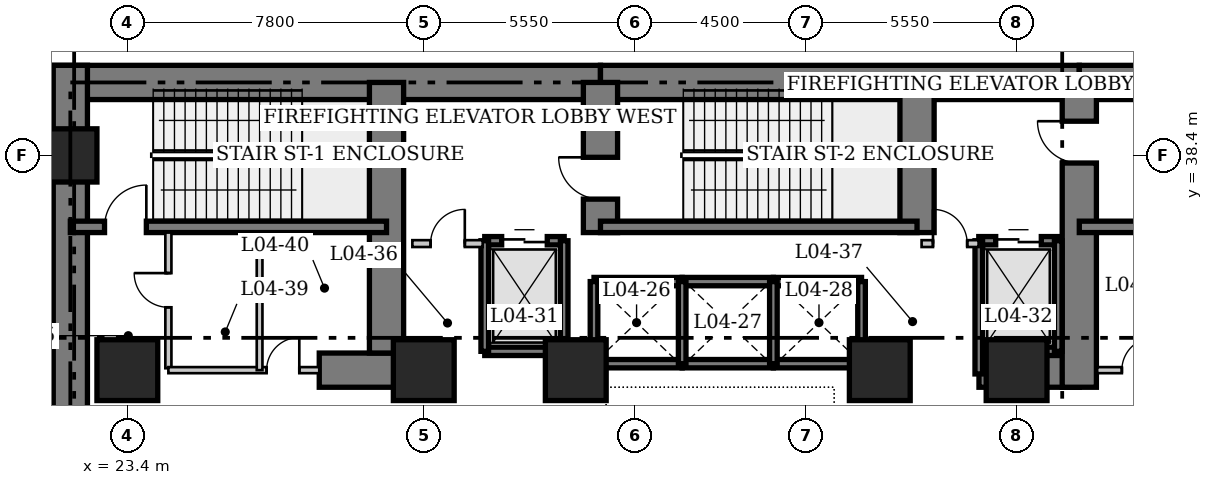
"""IFC4 building model, lengths in metres.
Left out: names, types, materials, properties, quantities, classifications, styles, units other than length and angle.
Written with IfcOpenShell. Run it as: python <this file> out.ifc"""

import sys

from ifc_helpers import new_model, si_unit, direction, frame, frame_2d, origin, origin_2d, place, context, subcontext, project, spatial, rectangle, extrude, element, fill, save


model = new_model("IFC4")
c1 = context("Model", 3, precision=1e-05, world=origin(), true_north=direction((0.0, 1.0)))
c2 = subcontext(c1, "Body", "Model", "MODEL_VIEW")
j1 = project(units=[si_unit("LENGTHUNIT", "METRE"), si_unit("PLANEANGLEUNIT", "RADIAN")], contexts=[c1])
p1 = place(None, origin())
s1 = spatial("IfcSite", under=j1, at=p1, CompositionType="ELEMENT")
p2 = place(p1, origin())
s2 = spatial("IfcBuilding", under=s1, at=p2, CompositionType="ELEMENT")
p3 = place(p2, frame((0.0, 0.0, 20.8)))
s3 = spatial("IfcBuildingStorey", under=s2, at=p3, CompositionType="ELEMENT", Elevation=20.8)
p4 = place(p3, frame((21.45, 40.32, 0.0), z_axis=(0.0, 0.0, 1.0), x_axis=(1.0, 0.0, 0.0)))
e1 = element("IfcWall", 1, at=p4, inside=s3, PredefinedType="SHEAR", context=c2, shape_type="SweptSolid", body=[
    extrude(rectangle(XDim=14.4, YDim=0.9, at=frame_2d((7.2, 0.0))), origin(), (0.0, 0.0, 1.0), 5.2),
])
p5 = place(p3, frame((35.85, 40.32, 0.0), z_axis=(0.0, 0.0, 1.0), x_axis=(1.0, 0.0, 0.0)))
e2 = element("IfcWall", 2, at=p5, inside=s3, PredefinedType="SHEAR", context=c2, shape_type="SweptSolid", body=[
    extrude(rectangle(XDim=12.6, YDim=0.9, at=frame_2d((6.3, 0.0))), origin(), (0.0, 0.0, 1.0), 5.2),
])
p6 = place(p3, frame((48.45, 40.32, 0.0), z_axis=(0.0, 0.0, 1.0), x_axis=(1.0, 0.0, 0.0)))
e3 = element("IfcWall", 3, at=p6, inside=s3, PredefinedType="SHEAR", context=c2, shape_type="SweptSolid", body=[
    extrude(rectangle(XDim=8.97, YDim=0.9, at=frame_2d((4.485, 0.0))), origin(), (0.0, 0.0, 1.0), 5.2),
])
p7 = place(p3, frame((21.9, 27.05, 0.0), z_axis=(0.0, 0.0, 1.0), x_axis=(0.0, 1.0, 0.0)))
e4 = element("IfcWall", 4, at=p7, inside=s3, PredefinedType="SHEAR", context=c2, shape_type="SweptSolid", body=[
    extrude(rectangle(XDim=13.72, YDim=0.9, at=frame_2d((6.86, 0.0))), origin(), (0.0, 0.0, 1.0), 5.2),
])
p8 = place(p3, frame((28.45, 32.75, 0.0), z_axis=(0.0, 0.0, 1.0), x_axis=(1.0, 0.0, 0.0)))
e5 = element("IfcWall", 5, at=p8, inside=s3, PredefinedType="SHEAR", context=c2, shape_type="SweptSolid", body=[
    extrude(rectangle(XDim=2.4, YDim=0.9, at=frame_2d((1.2, 0.0))), origin(), (0.0, 0.0, 1.0), 5.2),
])
p9 = place(p3, frame((45.81, 32.75, 0.0), z_axis=(0.0, 0.0, 1.0), x_axis=(1.0, 0.0, 0.0)))
e6 = element("IfcWall", 6, at=p9, inside=s3, PredefinedType="SHEAR", context=c2, shape_type="SweptSolid", body=[
    extrude(rectangle(XDim=2.64, YDim=0.9, at=frame_2d((1.32, 0.0))), origin(), (0.0, 0.0, 1.0), 5.2),
])
p10 = place(p3, frame((30.22, 33.2, 0.0), z_axis=(0.0, 0.0, 1.0), x_axis=(0.0, 1.0, 0.0)))
e7 = element("IfcWall", 7, at=p10, inside=s3, PredefinedType="SHEAR", context=c2, shape_type="SweptSolid", body=[
    extrude(rectangle(XDim=7.12, YDim=0.9, at=frame_2d((3.56, 0.0))), origin(), (0.0, 0.0, 1.0), 5.2),
])
p11 = place(p3, frame((35.85, 36.37, 0.0), z_axis=(0.0, 0.0, 1.0), x_axis=(0.0, 1.0, 0.0)))
e8 = element("IfcWall", 8, at=p11, inside=s3, PredefinedType="SHEAR", context=c2, shape_type="SweptSolid", body=[
    extrude(rectangle(XDim=3.95, YDim=0.9, at=frame_2d((1.975, 0.0))), origin(), (0.0, 0.0, 1.0), 5.2),
])
p12 = place(p11, frame((0.88, 0.0, 0.0)))
e9 = element("IfcOpeningElement", 9, at=p12, cuts=e8, PredefinedType="OPENING", context=c2, shape_type="SweptSolid", body=[
    extrude(rectangle(XDim=1.1, YDim=2.15, at=frame_2d((0.55, 1.075))), frame((0.0, 0.46, 0.0), z_axis=(0.0, -1.0, 0.0), x_axis=(1.0, 0.0, 0.0)), (0.0, 0.0, 1.0), 0.92),
])
p13 = place(p3, frame((44.18, 36.37, 0.0), z_axis=(0.0, 0.0, 1.0), x_axis=(0.0, 1.0, 0.0)))
e10 = element("IfcWall", 10, at=p13, inside=s3, PredefinedType="SHEAR", context=c2, shape_type="SweptSolid", body=[
    extrude(rectangle(XDim=3.95, YDim=0.9, at=frame_2d((1.975, 0.0))), origin(), (0.0, 0.0, 1.0), 5.2),
])
p14 = place(p3, frame((48.45, 32.3, 0.0), z_axis=(0.0, 0.0, 1.0), x_axis=(0.0, 1.0, 0.0)))
e11 = element("IfcWall", 11, at=p14, inside=s3, PredefinedType="SHEAR", context=c2, shape_type="SweptSolid", body=[
    extrude(rectangle(XDim=8.02, YDim=0.9, at=frame_2d((4.01, 0.0))), origin(), (0.0, 0.0, 1.0), 5.2),
])
p15 = place(p14, frame((5.9, 0.0, 0.0)))
e12 = element("IfcOpeningElement", 12, at=p15, cuts=e11, PredefinedType="OPENING", context=c2, shape_type="SweptSolid", body=[
    extrude(rectangle(XDim=1.1, YDim=2.15, at=frame_2d((0.55, 1.075))), frame((0.0, 0.46, 0.0), z_axis=(0.0, -1.0, 0.0), x_axis=(1.0, 0.0, 0.0)), (0.0, 0.0, 1.0), 0.92),
])
p16 = place(p3, frame((21.9, 36.52, 0.0), z_axis=(0.0, 0.0, 1.0), x_axis=(1.0, 0.0, 0.0)))
e13 = element("IfcWall", 13, at=p16, inside=s3, PredefinedType="SHEAR", context=c2, shape_type="SweptSolid", body=[
    extrude(rectangle(XDim=8.32, YDim=0.3, at=frame_2d((4.16, 0.0))), origin(), (0.0, 0.0, 1.0), 5.2),
])
p17 = place(p16, frame((0.9, 0.0, 0.0)))
e14 = element("IfcOpeningElement", 14, at=p17, cuts=e13, PredefinedType="OPENING", context=c2, shape_type="SweptSolid", body=[
    extrude(rectangle(XDim=1.1, YDim=2.15, at=frame_2d((0.55, 1.075))), frame((0.0, 0.16, 0.0), z_axis=(0.0, -1.0, 0.0), x_axis=(1.0, 0.0, 0.0)), (0.0, 0.0, 1.0), 0.32),
])
p18 = place(p3, frame((35.85, 36.52, 0.0), z_axis=(0.0, 0.0, 1.0), x_axis=(1.0, 0.0, 0.0)))
e15 = element("IfcWall", 15, at=p18, inside=s3, PredefinedType="SHEAR", context=c2, shape_type="SweptSolid", body=[
    extrude(rectangle(XDim=8.33, YDim=0.3, at=frame_2d((4.165, 0.0))), origin(), (0.0, 0.0, 1.0), 5.2),
])
p19 = place(p3, frame((48.45, 36.52, 0.0), z_axis=(0.0, 0.0, 1.0), x_axis=(1.0, 0.0, 0.0)))
e16 = element("IfcWall", 16, at=p19, inside=s3, PredefinedType="SHEAR", context=c2, shape_type="SweptSolid", body=[
    extrude(rectangle(XDim=8.52, YDim=0.3, at=frame_2d((4.26, 0.0))), origin(), (0.0, 0.0, 1.0), 5.2),
])
p20 = place(p3, frame((21.9, 38.4, 0.0), z_axis=(0.0, 0.0, 1.0), x_axis=(1.0, 0.0, 0.0)))
e17 = element("IfcColumn", 17, at=p20, inside=s3, PredefinedType="COLUMN", context=c2, shape_type="SweptSolid", body=[
    extrude(rectangle(XDim=1.4, YDim=1.4, at=origin_2d()), origin(), (0.0, 0.0, 1.0), 5.2),
])
for number, where, z_axis, x_axis in (
    (18, (23.4, 32.75, 0.0), (0.0, 0.0, 1.0), (1.0, 0.0, 0.0)),
    (19, (31.2, 32.75, 0.0), (0.0, 0.0, 1.0), (1.0, 0.0, 0.0)),
    (20, (35.2, 32.75, 0.0), (0.0, 0.0, 1.0), (1.0, 0.0, 0.0)),
    (21, (43.2, 32.75, 0.0), (0.0, 0.0, 1.0), (1.0, 0.0, 0.0)),
    (22, (46.8, 32.75, 0.0), (0.0, 0.0, 1.0), (1.0, 0.0, 0.0)),
):
    element("IfcColumn", number, at=place(p3, frame(where, z_axis=z_axis, x_axis=x_axis)), inside=s3, PredefinedType="COLUMN", context=c2, shape_type="SweptSolid", body=[
        extrude(rectangle(XDim=1.6, YDim=1.6, at=origin_2d()), origin(), (0.0, 0.0, 1.0), 5.2),
    ])
for number, where, z_axis, x_axis in (
    (23, (35.68, 35.08, 0.0), (0.0, 0.0, 1.0), (1.0, 0.0, 0.0)),
    (24, (35.68, 32.92, 0.0), (0.0, 0.0, 1.0), (1.0, 0.0, 0.0)),
):
    element("IfcWall", number, at=place(p3, frame(where, z_axis=z_axis, x_axis=x_axis)), inside=s3, PredefinedType="SHEAR", context=c2, shape_type="SweptSolid", body=[
        extrude(rectangle(XDim=2.32, YDim=0.22, at=frame_2d((1.16, 0.0))), origin(), (0.0, 0.0, 1.0), 5.2),
    ])
p21 = place(p3, frame((35.68, 32.92, 0.0), z_axis=(0.0, 0.0, 1.0), x_axis=(0.0, 1.0, 0.0)))
e25 = element("IfcWall", 25, at=p21, inside=s3, PredefinedType="SHEAR", context=c2, shape_type="SweptSolid", body=[
    extrude(rectangle(XDim=2.16, YDim=0.2, at=frame_2d((1.08, 0.0))), origin(), (0.0, 0.0, 1.0), 5.2),
])
for number, where, z_axis, x_axis in (
    (26, (38.0, 35.08, 0.0), (0.0, 0.0, 1.0), (1.0, 0.0, 0.0)),
    (27, (38.0, 32.92, 0.0), (0.0, 0.0, 1.0), (1.0, 0.0, 0.0)),
):
    element("IfcWall", number, at=place(p3, frame(where, z_axis=z_axis, x_axis=x_axis)), inside=s3, PredefinedType="SHEAR", context=c2, shape_type="SweptSolid", body=[
        extrude(rectangle(XDim=2.4, YDim=0.22, at=frame_2d((1.2, 0.0))), origin(), (0.0, 0.0, 1.0), 5.2),
    ])
p22 = place(p3, frame((38.0, 32.92, 0.0), z_axis=(0.0, 0.0, 1.0), x_axis=(0.0, 1.0, 0.0)))
e28 = element("IfcWall", 28, at=p22, inside=s3, PredefinedType="SHEAR", context=c2, shape_type="SweptSolid", body=[
    extrude(rectangle(XDim=2.16, YDim=0.2, at=frame_2d((1.08, 0.0))), origin(), (0.0, 0.0, 1.0), 5.2),
])
for number, where, z_axis, x_axis in (
    (29, (40.4, 35.08, 0.0), (0.0, 0.0, 1.0), (1.0, 0.0, 0.0)),
    (30, (40.4, 32.92, 0.0), (0.0, 0.0, 1.0), (1.0, 0.0, 0.0)),
):
    element("IfcWall", number, at=place(p3, frame(where, z_axis=z_axis, x_axis=x_axis)), inside=s3, PredefinedType="SHEAR", context=c2, shape_type="SweptSolid", body=[
        extrude(rectangle(XDim=2.32, YDim=0.22, at=frame_2d((1.16, 0.0))), origin(), (0.0, 0.0, 1.0), 5.2),
    ])
for number, where, z_axis, x_axis in (
    (31, (40.4, 32.92, 0.0), (0.0, 0.0, 1.0), (0.0, 1.0, 0.0)),
    (32, (42.72, 32.92, 0.0), (0.0, 0.0, 1.0), (0.0, 1.0, 0.0)),
):
    element("IfcWall", number, at=place(p3, frame(where, z_axis=z_axis, x_axis=x_axis)), inside=s3, PredefinedType="SHEAR", context=c2, shape_type="SweptSolid", body=[
        extrude(rectangle(XDim=2.16, YDim=0.2, at=frame_2d((1.08, 0.0))), origin(), (0.0, 0.0, 1.0), 5.2),
    ])
p23 = place(p3, frame((32.805, 36.155, 0.0), z_axis=(0.0, 0.0, 1.0), x_axis=(1.0, 0.0, 0.0)))
e33 = element("IfcWall", 33, at=p23, inside=s3, PredefinedType="SHEAR", context=c2, shape_type="SweptSolid", body=[
    extrude(rectangle(XDim=2.09, YDim=0.22, at=frame_2d((1.045, 0.0))), origin(), (0.0, 0.0, 1.0), 5.2),
])
p24 = place(p23, frame((0.445, 0.0, 0.0)))
e34 = element("IfcOpeningElement", 34, at=p24, cuts=e33, PredefinedType="OPENING", context=c2, shape_type="SweptSolid", body=[
    extrude(rectangle(XDim=1.2, YDim=2.15, at=frame_2d((0.6, 1.075))), frame((0.0, 0.12, 0.0), z_axis=(0.0, -1.0, 0.0), x_axis=(1.0, 0.0, 0.0)), (0.0, 0.0, 1.0), 0.24),
])
p25 = place(p3, frame((32.805, 33.245, 0.0), z_axis=(0.0, 0.0, 1.0), x_axis=(1.0, 0.0, 0.0)))
e35 = element("IfcWall", 35, at=p25, inside=s3, PredefinedType="SHEAR", context=c2, shape_type="SweptSolid", body=[
    extrude(rectangle(XDim=2.09, YDim=0.22, at=frame_2d((1.045, 0.0))), origin(), (0.0, 0.0, 1.0), 5.2),
])
for number, where, z_axis, x_axis in (
    (36, (32.805, 33.245, 0.0), (0.0, 0.0, 1.0), (0.0, 1.0, 0.0)),
    (37, (34.895, 33.245, 0.0), (0.0, 0.0, 1.0), (0.0, 1.0, 0.0)),
):
    element("IfcWall", number, at=place(p3, frame(where, z_axis=z_axis, x_axis=x_axis)), inside=s3, PredefinedType="SHEAR", context=c2, shape_type="SweptSolid", body=[
        extrude(rectangle(XDim=2.91, YDim=0.2, at=frame_2d((1.455, 0.0))), origin(), (0.0, 0.0, 1.0), 5.2),
    ])
p26 = place(p3, frame((45.805, 36.155, 0.0), z_axis=(0.0, 0.0, 1.0), x_axis=(1.0, 0.0, 0.0)))
e38 = element("IfcWall", 38, at=p26, inside=s3, PredefinedType="SHEAR", context=c2, shape_type="SweptSolid", body=[
    extrude(rectangle(XDim=2.09, YDim=0.22, at=frame_2d((1.045, 0.0))), origin(), (0.0, 0.0, 1.0), 5.2),
])
p27 = place(p26, frame((0.445, 0.0, 0.0)))
e39 = element("IfcOpeningElement", 39, at=p27, cuts=e38, PredefinedType="OPENING", context=c2, shape_type="SweptSolid", body=[
    extrude(rectangle(XDim=1.2, YDim=2.15, at=frame_2d((0.6, 1.075))), frame((0.0, 0.12, 0.0), z_axis=(0.0, -1.0, 0.0), x_axis=(1.0, 0.0, 0.0)), (0.0, 0.0, 1.0), 0.24),
])
p28 = place(p3, frame((45.805, 33.245, 0.0), z_axis=(0.0, 0.0, 1.0), x_axis=(1.0, 0.0, 0.0)))
e40 = element("IfcWall", 40, at=p28, inside=s3, PredefinedType="SHEAR", context=c2, shape_type="SweptSolid", body=[
    extrude(rectangle(XDim=2.09, YDim=0.22, at=frame_2d((1.045, 0.0))), origin(), (0.0, 0.0, 1.0), 5.2),
])
p29 = place(p3, frame((45.805, 32.65, 0.0), z_axis=(0.0, 0.0, 1.0), x_axis=(0.0, 1.0, 0.0)))
e41 = element("IfcWall", 41, at=p29, inside=s3, PredefinedType="SHEAR", context=c2, shape_type="SweptSolid", body=[
    extrude(rectangle(XDim=3.505, YDim=0.2, at=frame_2d((1.752, 0.0))), origin(), (0.0, 0.0, 1.0), 5.2),
])
p30 = place(p3, frame((47.895, 33.245, 0.0), z_axis=(0.0, 0.0, 1.0), x_axis=(0.0, 1.0, 0.0)))
e42 = element("IfcWall", 42, at=p30, inside=s3, PredefinedType="SHEAR", context=c2, shape_type="SweptSolid", body=[
    extrude(rectangle(XDim=2.91, YDim=0.2, at=frame_2d((1.455, 0.0))), origin(), (0.0, 0.0, 1.0), 5.2),
])
p31 = place(p3, frame((30.9, 36.08, 0.0), z_axis=(0.0, 0.0, 1.0), x_axis=(1.0, 0.0, 0.0)))
e43 = element("IfcWall", 43, at=p31, inside=s3, PredefinedType="PARTITIONING", context=c2, shape_type="SweptSolid", body=[
    extrude(rectangle(XDim=1.85, YDim=0.18, at=frame_2d((0.925, 0.0))), origin(), (0.0, 0.0, 1.0), 4.94),
])
p32 = place(p31, frame((0.48, 0.0, 0.0)))
e44 = element("IfcOpeningElement", 44, at=p32, cuts=e43, PredefinedType="OPENING", context=c2, shape_type="SweptSolid", body=[
    extrude(rectangle(XDim=0.9, YDim=2.15, at=frame_2d((0.45, 1.075))), frame((0.0, 0.1, 0.0), z_axis=(0.0, -1.0, 0.0), x_axis=(1.0, 0.0, 0.0)), (0.0, 0.0, 1.0), 0.2),
])
p33 = place(p3, frame((44.3, 36.08, 0.0), z_axis=(0.0, 0.0, 1.0), x_axis=(1.0, 0.0, 0.0)))
e45 = element("IfcWall", 45, at=p33, inside=s3, PredefinedType="PARTITIONING", context=c2, shape_type="SweptSolid", body=[
    extrude(rectangle(XDim=1.5, YDim=0.18, at=frame_2d((0.75, 0.0))), origin(), (0.0, 0.0, 1.0), 4.94),
])
p34 = place(p33, frame((0.3, 0.0, 0.0)))
e46 = element("IfcOpeningElement", 46, at=p34, cuts=e45, PredefinedType="OPENING", context=c2, shape_type="SweptSolid", body=[
    extrude(rectangle(XDim=0.9, YDim=2.15, at=frame_2d((0.45, 1.075))), frame((0.0, 0.1, 0.0), z_axis=(0.0, -1.0, 0.0), x_axis=(1.0, 0.0, 0.0)), (0.0, 0.0, 1.0), 0.2),
])
p35 = place(p3, frame((24.48, 32.8, 0.0), z_axis=(0.0, 0.0, 1.0), x_axis=(0.0, 1.0, 0.0)))
e47 = element("IfcWall", 47, at=p35, inside=s3, PredefinedType="PARTITIONING", context=c2, shape_type="SweptSolid", body=[
    extrude(rectangle(XDim=3.57, YDim=0.16, at=frame_2d((1.785, 0.0))), origin(), (0.0, 0.0, 1.0), 4.94),
])
p36 = place(p35, frame((1.604, 0.0, 0.0)))
e48 = element("IfcOpeningElement", 48, at=p36, cuts=e47, PredefinedType="OPENING", context=c2, shape_type="SweptSolid", body=[
    extrude(rectangle(XDim=0.9, YDim=2.1, at=frame_2d((0.45, 1.05))), frame((0.0, 0.09, 0.0), z_axis=(0.0, -1.0, 0.0), x_axis=(1.0, 0.0, 0.0)), (0.0, 0.0, 1.0), 0.18),
])
p37 = place(p3, frame((24.48, 32.75, 0.0), z_axis=(0.0, 0.0, 1.0), x_axis=(1.0, 0.0, 0.0)))
e49 = element("IfcWall", 49, at=p37, inside=s3, PredefinedType="PARTITIONING", context=c2, shape_type="SweptSolid", body=[
    extrude(rectangle(XDim=3.97, YDim=0.16, at=frame_2d((1.985, 0.0))), origin(), (0.0, 0.0, 1.0), 4.94),
])
p38 = place(p37, frame((2.585, 0.0, 0.0)))
e50 = element("IfcOpeningElement", 50, at=p38, cuts=e49, PredefinedType="OPENING", context=c2, shape_type="SweptSolid", body=[
    extrude(rectangle(XDim=0.86, YDim=2.05, at=frame_2d((0.43, 1.025))), frame((0.0, 0.09, 0.0), z_axis=(0.0, -1.0, 0.0), x_axis=(1.0, 0.0, 0.0)), (0.0, 0.0, 1.0), 0.18),
])
p39 = place(p3, frame((48.92, 32.75, 0.0), z_axis=(0.0, 0.0, 1.0), x_axis=(1.0, 0.0, 0.0)))
e51 = element("IfcWall", 51, at=p39, inside=s3, PredefinedType="PARTITIONING", context=c2, shape_type="SweptSolid", body=[
    extrude(rectangle(XDim=2.2, YDim=0.16, at=frame_2d((1.1, 0.0))), origin(), (0.0, 0.0, 1.0), 4.94),
])
p40 = place(p39, frame((0.65, 0.0, 0.0)))
e52 = element("IfcOpeningElement", 52, at=p40, cuts=e51, PredefinedType="OPENING", context=c2, shape_type="SweptSolid", body=[
    extrude(rectangle(XDim=0.86, YDim=2.05, at=frame_2d((0.43, 1.025))), frame((0.0, 0.09, 0.0), z_axis=(0.0, -1.0, 0.0), x_axis=(1.0, 0.0, 0.0)), (0.0, 0.0, 1.0), 0.18),
])
p41 = place(p3, frame((26.88, 32.75, 0.0), z_axis=(0.0, 0.0, 1.0), x_axis=(0.0, 1.0, 0.0)))
e53 = element("IfcWall", 53, at=p41, inside=s3, PredefinedType="PARTITIONING", context=c2, shape_type="SweptSolid", body=[
    extrude(rectangle(XDim=3.62, YDim=0.15, at=frame_2d((1.81, 0.0))), origin(), (0.0, 0.0, 1.0), 4.94),
])
p42 = place(p24, origin())
e54 = element("IfcDoor", 54, at=p42, inside=s3, OperationType="DOUBLE_DOOR_SLIDING", PredefinedType="DOOR", context=c2, shape_type="SweptSolid", body=[
    extrude(rectangle(XDim=1.2, YDim=2.15, at=frame_2d((0.6, 1.075))), frame((0.0, 0.025, 0.0), z_axis=(0.0, -1.0, 0.0), x_axis=(1.0, 0.0, 0.0)), (0.0, 0.0, 1.0), 0.05),
])
fill(e34, e54)
p43 = place(p27, origin())
e55 = element("IfcDoor", 55, at=p43, inside=s3, OperationType="DOUBLE_DOOR_SLIDING", PredefinedType="DOOR", context=c2, shape_type="SweptSolid", body=[
    extrude(rectangle(XDim=1.2, YDim=2.15, at=frame_2d((0.6, 1.075))), frame((0.0, 0.025, 0.0), z_axis=(0.0, -1.0, 0.0), x_axis=(1.0, 0.0, 0.0)), (0.0, 0.0, 1.0), 0.05),
])
fill(e39, e55)
p44 = place(p32, origin())
e56 = element("IfcDoor", 56, at=p44, inside=s3, OperationType="SINGLE_SWING_RIGHT", PredefinedType="DOOR", context=c2, shape_type="SweptSolid", body=[
    extrude(rectangle(XDim=0.9, YDim=2.15, at=frame_2d((0.45, 1.075))), frame((0.0, 0.025, 0.0), z_axis=(0.0, -1.0, 0.0), x_axis=(1.0, 0.0, 0.0)), (0.0, 0.0, 1.0), 0.05),
])
fill(e44, e56)
p45 = place(p34, origin())
e57 = element("IfcDoor", 57, at=p45, inside=s3, OperationType="SINGLE_SWING_LEFT", PredefinedType="DOOR", context=c2, shape_type="SweptSolid", body=[
    extrude(rectangle(XDim=0.9, YDim=2.15, at=frame_2d((0.45, 1.075))), frame((0.0, 0.025, 0.0), z_axis=(0.0, -1.0, 0.0), x_axis=(1.0, 0.0, 0.0)), (0.0, 0.0, 1.0), 0.05),
])
fill(e46, e57)
p46 = place(p36, origin())
e58 = element("IfcDoor", 58, at=p46, inside=s3, OperationType="SINGLE_SWING_RIGHT", PredefinedType="DOOR", context=c2, shape_type="SweptSolid", body=[
    extrude(rectangle(XDim=0.9, YDim=2.1, at=frame_2d((0.45, 1.05))), frame((0.0, 0.025, 0.0), z_axis=(0.0, -1.0, 0.0), x_axis=(1.0, 0.0, 0.0)), (0.0, 0.0, 1.0), 0.05),
])
fill(e48, e58)
p47 = place(p38, origin())
e59 = element("IfcDoor", 59, at=p47, inside=s3, OperationType="SINGLE_SWING_RIGHT", PredefinedType="DOOR", context=c2, shape_type="SweptSolid", body=[
    extrude(rectangle(XDim=0.86, YDim=2.05, at=frame_2d((0.43, 1.025))), frame((0.0, 0.025, 0.0), z_axis=(0.0, -1.0, 0.0), x_axis=(1.0, 0.0, 0.0)), (0.0, 0.0, 1.0), 0.05),
])
fill(e50, e59)
p48 = place(p40, origin())
e60 = element("IfcDoor", 60, at=p48, inside=s3, OperationType="SINGLE_SWING_RIGHT", PredefinedType="DOOR", context=c2, shape_type="SweptSolid", body=[
    extrude(rectangle(XDim=0.86, YDim=2.05, at=frame_2d((0.43, 1.025))), frame((0.0, 0.025, 0.0), z_axis=(0.0, -1.0, 0.0), x_axis=(1.0, 0.0, 0.0)), (0.0, 0.0, 1.0), 0.05),
])
fill(e52, e60)
p49 = place(p17, origin())
e61 = element("IfcDoor", 61, at=p49, inside=s3, OperationType="SINGLE_SWING_RIGHT", PredefinedType="DOOR", context=c2, shape_type="SweptSolid", body=[
    extrude(rectangle(XDim=1.1, YDim=2.15, at=frame_2d((0.55, 1.075))), frame((0.0, 0.025, 0.0), z_axis=(0.0, -1.0, 0.0), x_axis=(1.0, 0.0, 0.0)), (0.0, 0.0, 1.0), 0.05),
])
fill(e14, e61)
p50 = place(p12, origin())
e62 = element("IfcDoor", 62, at=p50, inside=s3, OperationType="SINGLE_SWING_RIGHT", PredefinedType="DOOR", context=c2, shape_type="SweptSolid", body=[
    extrude(rectangle(XDim=1.1, YDim=2.15, at=frame_2d((0.55, 1.075))), frame((0.0, 0.025, 0.0), z_axis=(0.0, -1.0, 0.0), x_axis=(1.0, 0.0, 0.0)), (0.0, 0.0, 1.0), 0.05),
])
fill(e9, e62)
p51 = place(p15, origin())
e63 = element("IfcDoor", 63, at=p51, inside=s3, OperationType="SINGLE_SWING_RIGHT", PredefinedType="DOOR", context=c2, shape_type="SweptSolid", body=[
    extrude(rectangle(XDim=1.1, YDim=2.15, at=frame_2d((0.55, 1.075))), frame((0.0, 0.025, 0.0), z_axis=(0.0, -1.0, 0.0), x_axis=(1.0, 0.0, 0.0)), (0.0, 0.0, 1.0), 0.05),
])
fill(e12, e63)
save(model, sys.argv[1])
